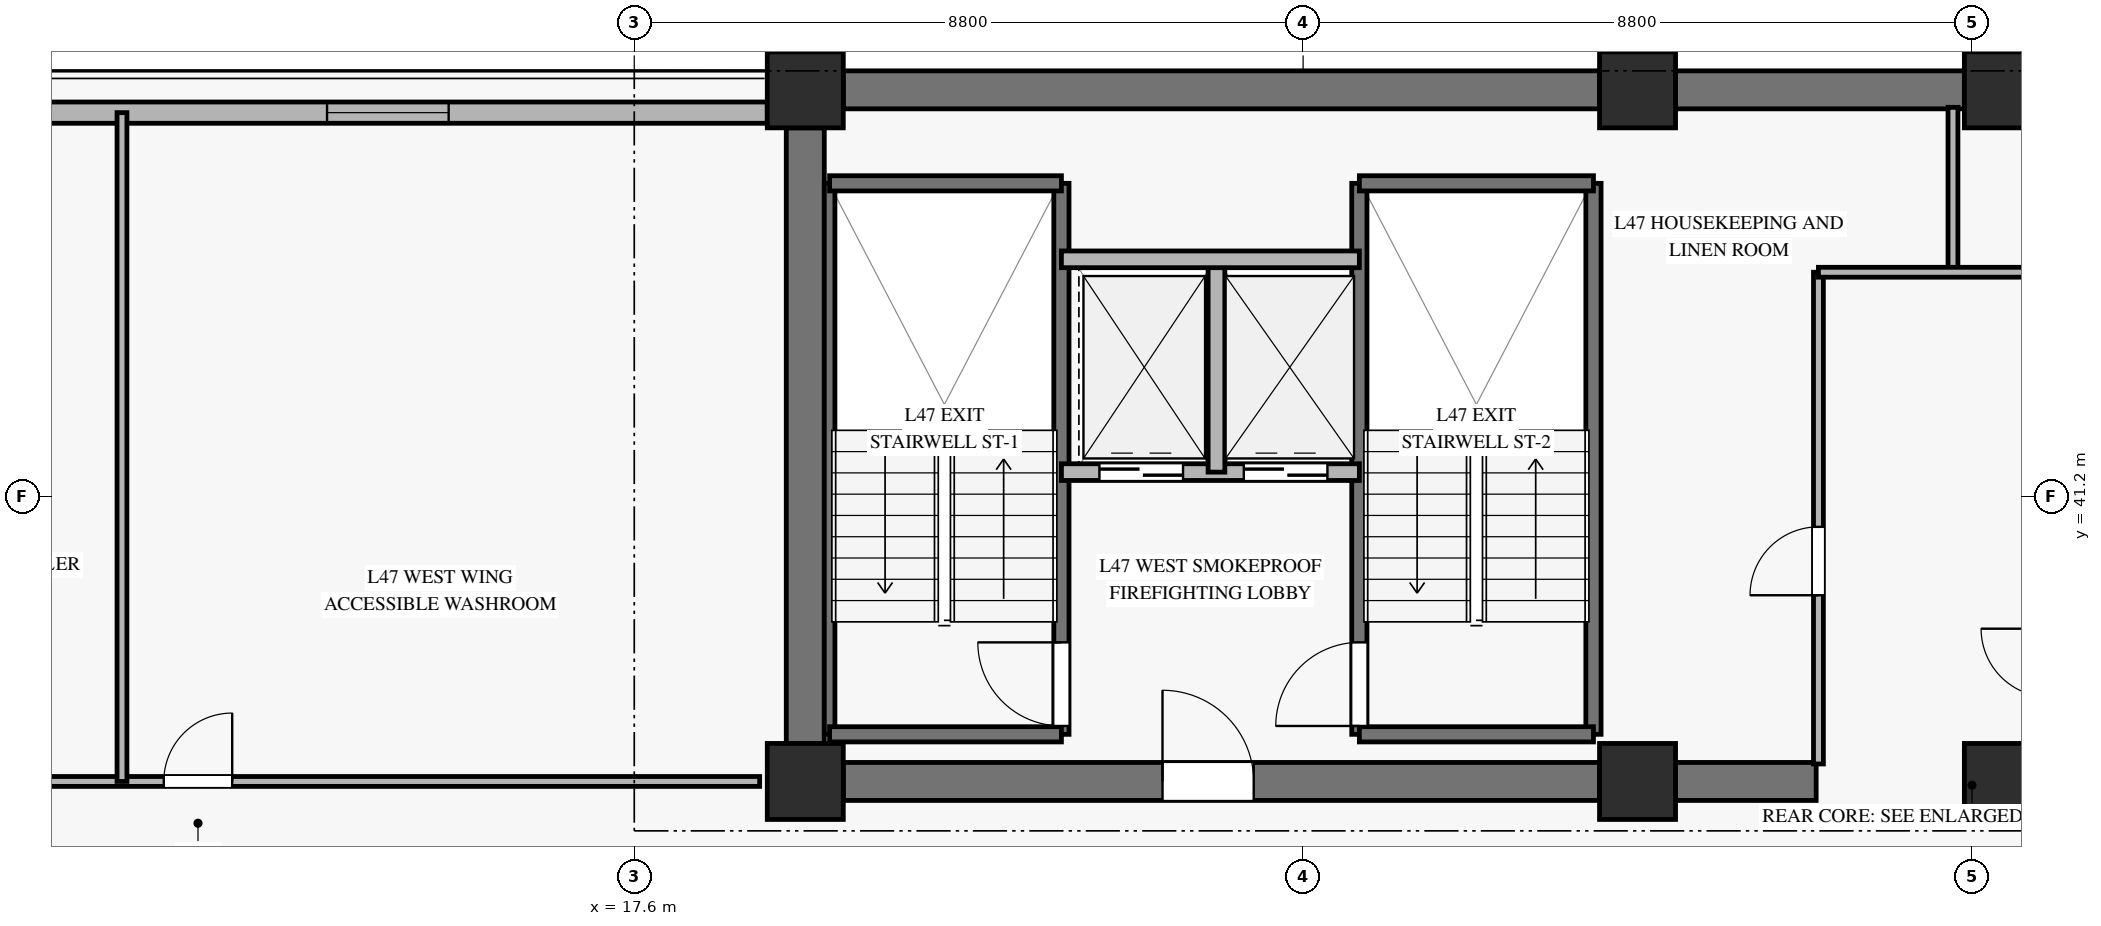
"""IFC4 building model, lengths in metres.
Left out: names, types, materials, properties, quantities, classifications, styles, units other than length and angle.
Written with IfcOpenShell. Run it as: python <this file> out.ifc"""

import sys

from ifc_helpers import new_model, si_unit, direction, frame, frame_2d, origin, origin_2d, place, context, subcontext, project, spatial, rectangle, extrude, source, transform, mapped, element, fill, save


model = new_model("IFC4")
c1 = context("Model", 3, precision=1e-05, world=origin(), true_north=direction((0.0, 1.0)))
c2 = subcontext(c1, "Body", "Model", "MODEL_VIEW")
j1 = project(units=[si_unit("LENGTHUNIT", "METRE"), si_unit("PLANEANGLEUNIT", "RADIAN")], contexts=[c1])
p1 = place(None, origin())
s1 = spatial("IfcSite", under=j1, at=p1, CompositionType="ELEMENT")
p2 = place(p1, origin())
s2 = spatial("IfcBuilding", under=s1, at=p2, CompositionType="ELEMENT")
p3 = place(p2, frame((0.0, 0.0, 187.7)))
s3 = spatial("IfcBuildingStorey", under=s2, at=p3, CompositionType="ELEMENT", Elevation=187.7)
m1 = source(origin(), c2, "Body", "SweptSolid", [
    extrude(rectangle(XDim=1.0, YDim=1.0, at=origin_2d()), origin(), (0.0, 0.0, 1.0), 3.22),
])
for number, where, z_axis, x_axis in (
    (1, (19.85, 37.45, 0.0), (0.0, 0.0, 1.0), (1.0, 0.0, 0.0)),
    (2, (19.85, 46.55, 0.0), (0.0, 0.0, 1.0), (1.0, 0.0, 0.0)),
    (3, (30.8, 37.45, 0.0), (0.0, 0.0, 1.0), (1.0, 0.0, 0.0)),
    (4, (30.8, 46.55, 0.0), (0.0, 0.0, 1.0), (1.0, 0.0, 0.0)),
    (5, (35.6, 37.45, 0.0), (0.0, 0.0, 1.0), (1.0, 0.0, 0.0)),
    (6, (35.6, 46.55, 0.0), (0.0, 0.0, 1.0), (1.0, 0.0, 0.0)),
):
    element("IfcColumn", number, at=place(p3, frame(where, z_axis=z_axis, x_axis=x_axis)), inside=s3, PredefinedType="PILASTER", context=c2, shape_type="MappedRepresentation", body=[
        mapped(m1, transform((0.0, 0.0, 0.0), x_axis=(1.0, 0.0, 0.0), y_axis=(0.0, 1.0, 0.0), z_axis=(0.0, 0.0, 1.0), scale=1.0)),
    ])
p4 = place(p3, frame((20.35, 46.55, 0.0), z_axis=(0.0, 0.0, 1.0), x_axis=(1.0, 0.0, 0.0)))
e7 = element("IfcWall", 7, at=p4, inside=s3, PredefinedType="SHEAR", context=c2, shape_type="SweptSolid", body=[
    extrude(rectangle(XDim=9.95, YDim=0.5, at=frame_2d((4.975, 0.0))), origin(), (0.0, 0.0, 1.0), 3.22),
])
p5 = place(p3, frame((31.3, 46.55, 0.0), z_axis=(0.0, 0.0, 1.0), x_axis=(1.0, 0.0, 0.0)))
e8 = element("IfcWall", 8, at=p5, inside=s3, PredefinedType="SHEAR", context=c2, shape_type="SweptSolid", body=[
    extrude(rectangle(XDim=3.8, YDim=0.5, at=frame_2d((1.9, 0.0))), origin(), (0.0, 0.0, 1.0), 3.22),
])
p6 = place(p3, frame((20.35, 37.45, 0.0), z_axis=(0.0, 0.0, 1.0), x_axis=(1.0, 0.0, 0.0)))
e9 = element("IfcWall", 9, at=p6, inside=s3, PredefinedType="SHEAR", context=c2, shape_type="SweptSolid", body=[
    extrude(rectangle(XDim=9.95, YDim=0.5, at=frame_2d((4.975, 0.0))), origin(), (0.0, 0.0, 1.0), 3.22),
])
p7 = place(p6, frame((4.2, 0.0, 0.0)))
e10 = element("IfcOpeningElement", 10, at=p7, cuts=e9, PredefinedType="OPENING", context=c2, shape_type="SweptSolid", body=[
    extrude(rectangle(XDim=1.2, YDim=2.15, at=frame_2d((0.6, 1.075))), frame((0.0, 0.26, 0.0), z_axis=(0.0, -1.0, 0.0), x_axis=(1.0, 0.0, 0.0)), (0.0, 0.0, 1.0), 0.52),
])
p8 = place(p3, frame((31.3, 37.45, 0.0), z_axis=(0.0, 0.0, 1.0), x_axis=(1.0, 0.0, 0.0)))
e11 = element("IfcWall", 11, at=p8, inside=s3, PredefinedType="SHEAR", context=c2, shape_type="SweptSolid", body=[
    extrude(rectangle(XDim=1.85, YDim=0.5, at=frame_2d((0.925, 0.0))), origin(), (0.0, 0.0, 1.0), 3.22),
])
p9 = place(p3, frame((19.85, 37.95, 0.0), z_axis=(0.0, 0.0, 1.0), x_axis=(0.0, 1.0, 0.0)))
e12 = element("IfcWall", 12, at=p9, inside=s3, PredefinedType="SHEAR", context=c2, shape_type="SweptSolid", body=[
    extrude(rectangle(XDim=8.1, YDim=0.5, at=frame_2d((4.05, 0.0))), origin(), (0.0, 0.0, 1.0), 3.22),
])
p10 = place(p3, frame((9.365, 46.25, 0.0), z_axis=(0.0, 0.0, 1.0), x_axis=(1.0, 0.0, 0.0)))
e13 = element("IfcWall", 13, at=p10, inside=s3, PredefinedType="SOLIDWALL", context=c2, shape_type="SweptSolid", body=[
    extrude(rectangle(XDim=9.985, YDim=0.28, at=frame_2d((4.993, 0.0))), origin(), (0.0, 0.0, 1.0), 2.7),
])
p11 = place(p10, frame((4.193, 0.0, 0.45)))
e14 = element("IfcOpeningElement", 14, at=p11, cuts=e13, PredefinedType="OPENING", context=c2, shape_type="SweptSolid", body=[
    extrude(rectangle(XDim=1.6, YDim=2.0, at=frame_2d((0.8, 1.0))), frame((0.0, 0.15, 0.0), z_axis=(0.0, -1.0, 0.0), x_axis=(1.0, 0.0, 0.0)), (0.0, 0.0, 1.0), 0.3),
])
p12 = place(p3, frame((20.17, 38.07, 0.0), z_axis=(0.0, 0.0, 1.0), x_axis=(0.0, 1.0, 0.0)))
e15 = element("IfcWall", 15, at=p12, inside=s3, PredefinedType="SOLIDWALL", context=c2, shape_type="SweptSolid", body=[
    extrude(rectangle(XDim=7.25, YDim=0.14, at=frame_2d((3.625, 0.0))), origin(), (0.0, 0.0, 1.0), 3.5),
])
p13 = place(p3, frame((23.22, 38.07, 0.0), z_axis=(0.0, 0.0, 1.0), x_axis=(0.0, 1.0, 0.0)))
e16 = element("IfcWall", 16, at=p13, inside=s3, PredefinedType="SOLIDWALL", context=c2, shape_type="SweptSolid", body=[
    extrude(rectangle(XDim=7.25, YDim=0.2, at=frame_2d((3.625, 0.0))), origin(), (0.0, 0.0, 1.0), 3.5),
])
p14 = place(p13, frame((0.11, 0.0, 0.0)))
e17 = element("IfcOpeningElement", 17, at=p14, cuts=e16, PredefinedType="OPENING", context=c2, shape_type="SweptSolid", body=[
    extrude(rectangle(XDim=1.1, YDim=2.15, at=frame_2d((0.55, 1.075))), frame((0.0, 0.11, 0.0), z_axis=(0.0, -1.0, 0.0), x_axis=(1.0, 0.0, 0.0)), (0.0, 0.0, 1.0), 0.22),
])
for number, where, z_axis, x_axis in (
    (18, (20.17, 45.32, 0.0), (0.0, 0.0, 1.0), (1.0, 0.0, 0.0)),
    (19, (20.17, 38.07, 0.0), (0.0, 0.0, 1.0), (1.0, 0.0, 0.0)),
):
    element("IfcWall", number, at=place(p3, frame(where, z_axis=z_axis, x_axis=x_axis)), inside=s3, PredefinedType="SOLIDWALL", context=c2, shape_type="SweptSolid", body=[
        extrude(rectangle(XDim=3.05, YDim=0.2, at=frame_2d((1.525, 0.0))), origin(), (0.0, 0.0, 1.0), 3.5),
    ])
p15 = place(p3, frame((27.14, 38.07, 0.0), z_axis=(0.0, 0.0, 1.0), x_axis=(0.0, 1.0, 0.0)))
e20 = element("IfcWall", 20, at=p15, inside=s3, PredefinedType="SOLIDWALL", context=c2, shape_type="SweptSolid", body=[
    extrude(rectangle(XDim=7.25, YDim=0.2, at=frame_2d((3.625, 0.0))), origin(), (0.0, 0.0, 1.0), 3.5),
])
p16 = place(p15, frame((0.11, 0.0, 0.0)))
e21 = element("IfcOpeningElement", 21, at=p16, cuts=e20, PredefinedType="OPENING", context=c2, shape_type="SweptSolid", body=[
    extrude(rectangle(XDim=1.1, YDim=2.15, at=frame_2d((0.55, 1.075))), frame((0.0, 0.11, 0.0), z_axis=(0.0, -1.0, 0.0), x_axis=(1.0, 0.0, 0.0)), (0.0, 0.0, 1.0), 0.22),
])
p17 = place(p3, frame((30.22, 38.07, 0.0), z_axis=(0.0, 0.0, 1.0), x_axis=(0.0, 1.0, 0.0)))
e22 = element("IfcWall", 22, at=p17, inside=s3, PredefinedType="SOLIDWALL", context=c2, shape_type="SweptSolid", body=[
    extrude(rectangle(XDim=7.25, YDim=0.2, at=frame_2d((3.625, 0.0))), origin(), (0.0, 0.0, 1.0), 3.5),
])
for number, where, z_axis, x_axis in (
    (23, (27.14, 45.32, 0.0), (0.0, 0.0, 1.0), (1.0, 0.0, 0.0)),
    (24, (27.14, 38.07, 0.0), (0.0, 0.0, 1.0), (1.0, 0.0, 0.0)),
):
    element("IfcWall", number, at=place(p3, frame(where, z_axis=z_axis, x_axis=x_axis)), inside=s3, PredefinedType="SOLIDWALL", context=c2, shape_type="SweptSolid", body=[
        extrude(rectangle(XDim=3.08, YDim=0.2, at=frame_2d((1.54, 0.0))), origin(), (0.0, 0.0, 1.0), 3.5),
    ])
p18 = place(p3, frame((23.22, 41.52, 0.0), z_axis=(0.0, 0.0, 1.0), x_axis=(1.0, 0.0, 0.0)))
e25 = element("IfcWall", 25, at=p18, inside=s3, PredefinedType="SOLIDWALL", context=c2, shape_type="SweptSolid", body=[
    extrude(rectangle(XDim=3.92, YDim=0.22, at=frame_2d((1.96, 0.0))), origin(), (0.0, 0.0, 1.0), 3.22),
])
p19 = place(p18, frame((0.5, 0.0, 0.0)))
e26 = element("IfcOpeningElement", 26, at=p19, cuts=e25, PredefinedType="OPENING", context=c2, shape_type="SweptSolid", body=[
    extrude(rectangle(XDim=1.1, YDim=2.2, at=frame_2d((0.55, 1.1))), frame((0.0, 0.12, 0.0), z_axis=(0.0, -1.0, 0.0), x_axis=(1.0, 0.0, 0.0)), (0.0, 0.0, 1.0), 0.24),
])
p20 = place(p18, frame((2.4, 0.0, 0.0)))
e27 = element("IfcOpeningElement", 27, at=p20, cuts=e25, PredefinedType="OPENING", context=c2, shape_type="SweptSolid", body=[
    extrude(rectangle(XDim=1.1, YDim=2.2, at=frame_2d((0.55, 1.1))), frame((0.0, 0.12, 0.0), z_axis=(0.0, -1.0, 0.0), x_axis=(1.0, 0.0, 0.0)), (0.0, 0.0, 1.0), 0.24),
])
p21 = place(p3, frame((25.26, 41.52, 0.0), z_axis=(0.0, 0.0, 1.0), x_axis=(0.0, 1.0, 0.0)))
e28 = element("IfcWall", 28, at=p21, inside=s3, PredefinedType="SOLIDWALL", context=c2, shape_type="SweptSolid", body=[
    extrude(rectangle(XDim=2.8, YDim=0.22, at=frame_2d((1.4, 0.0))), origin(), (0.0, 0.0, 1.0), 3.22),
])
p22 = place(p3, frame((23.22, 44.32, 0.0), z_axis=(0.0, 0.0, 1.0), x_axis=(1.0, 0.0, 0.0)))
e29 = element("IfcWall", 29, at=p22, inside=s3, PredefinedType="SOLIDWALL", context=c2, shape_type="SweptSolid", body=[
    extrude(rectangle(XDim=3.92, YDim=0.22, at=frame_2d((1.96, 0.0))), origin(), (0.0, 0.0, 1.0), 3.22),
])
p23 = place(p3, frame((33.18, 37.68, 0.0), z_axis=(0.0, 0.0, 1.0), x_axis=(0.0, 1.0, 0.0)))
e30 = element("IfcWall", 30, at=p23, inside=s3, PredefinedType="PARTITIONING", context=c2, shape_type="SweptSolid", body=[
    extrude(rectangle(XDim=6.47, YDim=0.13, at=frame_2d((3.235, 0.0))), origin(), (0.0, 0.0, 1.0), 2.305),
])
p24 = place(p23, frame((2.22, 0.0, 0.0)))
e31 = element("IfcOpeningElement", 31, at=p24, cuts=e30, PredefinedType="OPENING", context=c2, shape_type="SweptSolid", body=[
    extrude(rectangle(XDim=0.9, YDim=2.1, at=frame_2d((0.45, 1.05))), frame((0.0, 0.075, 0.0), z_axis=(0.0, -1.0, 0.0), x_axis=(1.0, 0.0, 0.0)), (0.0, 0.0, 1.0), 0.15),
])
p25 = place(p3, frame((34.95, 44.15, 0.0), z_axis=(0.0, 0.0, 1.0), x_axis=(0.0, 1.0, 0.0)))
e32 = element("IfcWall", 32, at=p25, inside=s3, PredefinedType="PARTITIONING", context=c2, shape_type="SweptSolid", body=[
    extrude(rectangle(XDim=2.17, YDim=0.13, at=frame_2d((1.085, 0.0))), origin(), (0.0, 0.0, 1.0), 3.22),
])
p26 = place(p3, frame((33.18, 44.15, 0.0), z_axis=(0.0, 0.0, 1.0), x_axis=(1.0, 0.0, 0.0)))
e33 = element("IfcWall", 33, at=p26, inside=s3, PredefinedType="PARTITIONING", context=c2, shape_type="SweptSolid", body=[
    extrude(rectangle(XDim=2.97, YDim=0.13, at=frame_2d((1.485, 0.0))), origin(), (0.0, 0.0, 1.0), 2.505),
])
p27 = place(p3, frame((6.154, 37.45, 0.0), z_axis=(0.0, 0.0, 1.0), x_axis=(1.0, 0.0, 0.0)))
e34 = element("IfcWall", 34, at=p27, inside=s3, PredefinedType="PARTITIONING", context=c2, shape_type="SweptSolid", body=[
    extrude(rectangle(XDim=13.096, YDim=0.13, at=frame_2d((6.548, 0.0))), origin(), (0.0, 0.0, 1.0), 2.705),
])
p28 = place(p27, frame((1.135, 0.0, 0.0)))
e35 = element("IfcOpeningElement", 35, at=p28, cuts=e34, PredefinedType="OPENING", context=c2, shape_type="SweptSolid", body=[
    extrude(rectangle(XDim=0.95, YDim=2.1, at=frame_2d((0.475, 1.05))), frame((0.0, 0.075, 0.0), z_axis=(0.0, -1.0, 0.0), x_axis=(1.0, 0.0, 0.0)), (0.0, 0.0, 1.0), 0.15),
])
p29 = place(p27, frame((5.256, 0.0, 0.0)))
e36 = element("IfcOpeningElement", 36, at=p29, cuts=e34, PredefinedType="OPENING", context=c2, shape_type="SweptSolid", body=[
    extrude(rectangle(XDim=0.9, YDim=2.1, at=frame_2d((0.45, 1.05))), frame((0.0, 0.075, 0.0), z_axis=(0.0, -1.0, 0.0), x_axis=(1.0, 0.0, 0.0)), (0.0, 0.0, 1.0), 0.15),
])
p30 = place(p3, frame((10.86, 37.45, 0.0), z_axis=(0.0, 0.0, 1.0), x_axis=(0.0, 1.0, 0.0)))
e37 = element("IfcWall", 37, at=p30, inside=s3, PredefinedType="PARTITIONING", context=c2, shape_type="SweptSolid", body=[
    extrude(rectangle(XDim=8.8, YDim=0.13, at=frame_2d((4.4, 0.0))), origin(), (0.0, 0.0, 1.0), 3.22),
])
m2 = source(origin(), c2, "Body", "SweptSolid", [
    extrude(rectangle(XDim=1.6, YDim=2.0, at=frame_2d((0.8, 1.0))), frame((0.0, 0.03, 0.0), z_axis=(0.0, -1.0, 0.0), x_axis=(1.0, 0.0, 0.0)), (0.0, 0.0, 1.0), 0.06),
])
p31 = place(p11, origin())
e38 = element("IfcWindow", 38, at=p31, inside=s3, PartitioningType="SINGLE_PANEL", PredefinedType="WINDOW", context=c2, shape_type="MappedRepresentation", body=[
    mapped(m2, transform((0.0, 0.0, 0.0), x_axis=(1.0, 0.0, 0.0), y_axis=(0.0, 1.0, 0.0), z_axis=(0.0, 0.0, 1.0), scale=1.0)),
])
fill(e14, e38)
m3 = source(origin(), c2, "Body", "SweptSolid", [
    extrude(rectangle(XDim=1.1, YDim=2.15, at=frame_2d((0.55, 1.075))), frame((0.0, 0.025, 0.0), z_axis=(0.0, -1.0, 0.0), x_axis=(1.0, 0.0, 0.0)), (0.0, 0.0, 1.0), 0.05),
])
p32 = place(p14, origin())
e39 = element("IfcDoor", 39, at=p32, inside=s3, OperationType="SINGLE_SWING_RIGHT", PredefinedType="DOOR", context=c2, shape_type="MappedRepresentation", body=[
    mapped(m3, transform((0.0, 0.0, 0.0), x_axis=(1.0, 0.0, 0.0), y_axis=(0.0, 1.0, 0.0), z_axis=(0.0, 0.0, 1.0), scale=1.0)),
])
fill(e17, e39)
p33 = place(p16, origin())
e40 = element("IfcDoor", 40, at=p33, inside=s3, OperationType="SINGLE_SWING_LEFT", PredefinedType="DOOR", context=c2, shape_type="MappedRepresentation", body=[
    mapped(m3, transform((0.0, 0.0, 0.0), x_axis=(1.0, 0.0, 0.0), y_axis=(0.0, 1.0, 0.0), z_axis=(0.0, 0.0, 1.0), scale=1.0)),
])
fill(e21, e40)
m4 = source(origin(), c2, "Body", "SweptSolid", [
    extrude(rectangle(XDim=1.1, YDim=2.2, at=frame_2d((0.55, 1.1))), frame((0.0, 0.025, 0.0), z_axis=(0.0, -1.0, 0.0), x_axis=(1.0, 0.0, 0.0)), (0.0, 0.0, 1.0), 0.05),
])
p34 = place(p19, origin())
e41 = element("IfcDoor", 41, at=p34, inside=s3, OperationType="SLIDING_TO_LEFT", PredefinedType="DOOR", context=c2, shape_type="MappedRepresentation", body=[
    mapped(m4, transform((0.0, 0.0, 0.0), x_axis=(1.0, 0.0, 0.0), y_axis=(0.0, 1.0, 0.0), z_axis=(0.0, 0.0, 1.0), scale=1.0)),
])
fill(e26, e41)
p35 = place(p20, origin())
e42 = element("IfcDoor", 42, at=p35, inside=s3, OperationType="SLIDING_TO_LEFT", PredefinedType="DOOR", context=c2, shape_type="MappedRepresentation", body=[
    mapped(m4, transform((0.0, 0.0, 0.0), x_axis=(1.0, 0.0, 0.0), y_axis=(0.0, 1.0, 0.0), z_axis=(0.0, 0.0, 1.0), scale=1.0)),
])
fill(e27, e42)
m5 = source(origin(), c2, "Body", "SweptSolid", [
    extrude(rectangle(XDim=1.2, YDim=2.15, at=frame_2d((0.6, 1.075))), frame((0.0, 0.025, 0.0), z_axis=(0.0, -1.0, 0.0), x_axis=(1.0, 0.0, 0.0)), (0.0, 0.0, 1.0), 0.05),
])
p36 = place(p7, origin())
e43 = element("IfcDoor", 43, at=p36, inside=s3, OperationType="SINGLE_SWING_LEFT", PredefinedType="DOOR", context=c2, shape_type="MappedRepresentation", body=[
    mapped(m5, transform((0.0, 0.0, 0.0), x_axis=(1.0, 0.0, 0.0), y_axis=(0.0, 1.0, 0.0), z_axis=(0.0, 0.0, 1.0), scale=1.0)),
])
fill(e10, e43)
m6 = source(origin(), c2, "Body", "SweptSolid", [
    extrude(rectangle(XDim=0.9, YDim=2.1, at=frame_2d((0.45, 1.05))), frame((0.0, 0.025, 0.0), z_axis=(0.0, -1.0, 0.0), x_axis=(1.0, 0.0, 0.0)), (0.0, 0.0, 1.0), 0.05),
])
p37 = place(p24, origin())
e44 = element("IfcDoor", 44, at=p37, inside=s3, OperationType="SINGLE_SWING_LEFT", PredefinedType="DOOR", context=c2, shape_type="MappedRepresentation", body=[
    mapped(m6, transform((0.0, 0.0, 0.0), x_axis=(1.0, 0.0, 0.0), y_axis=(0.0, 1.0, 0.0), z_axis=(0.0, 0.0, 1.0), scale=1.0)),
])
fill(e31, e44)
p38 = place(p29, origin())
e45 = element("IfcDoor", 45, at=p38, inside=s3, OperationType="SINGLE_SWING_RIGHT", PredefinedType="DOOR", context=c2, shape_type="MappedRepresentation", body=[
    mapped(m6, transform((0.0, 0.0, 0.0), x_axis=(1.0, 0.0, 0.0), y_axis=(0.0, 1.0, 0.0), z_axis=(0.0, 0.0, 1.0), scale=1.0)),
])
fill(e36, e45)
save(model, sys.argv[1])
